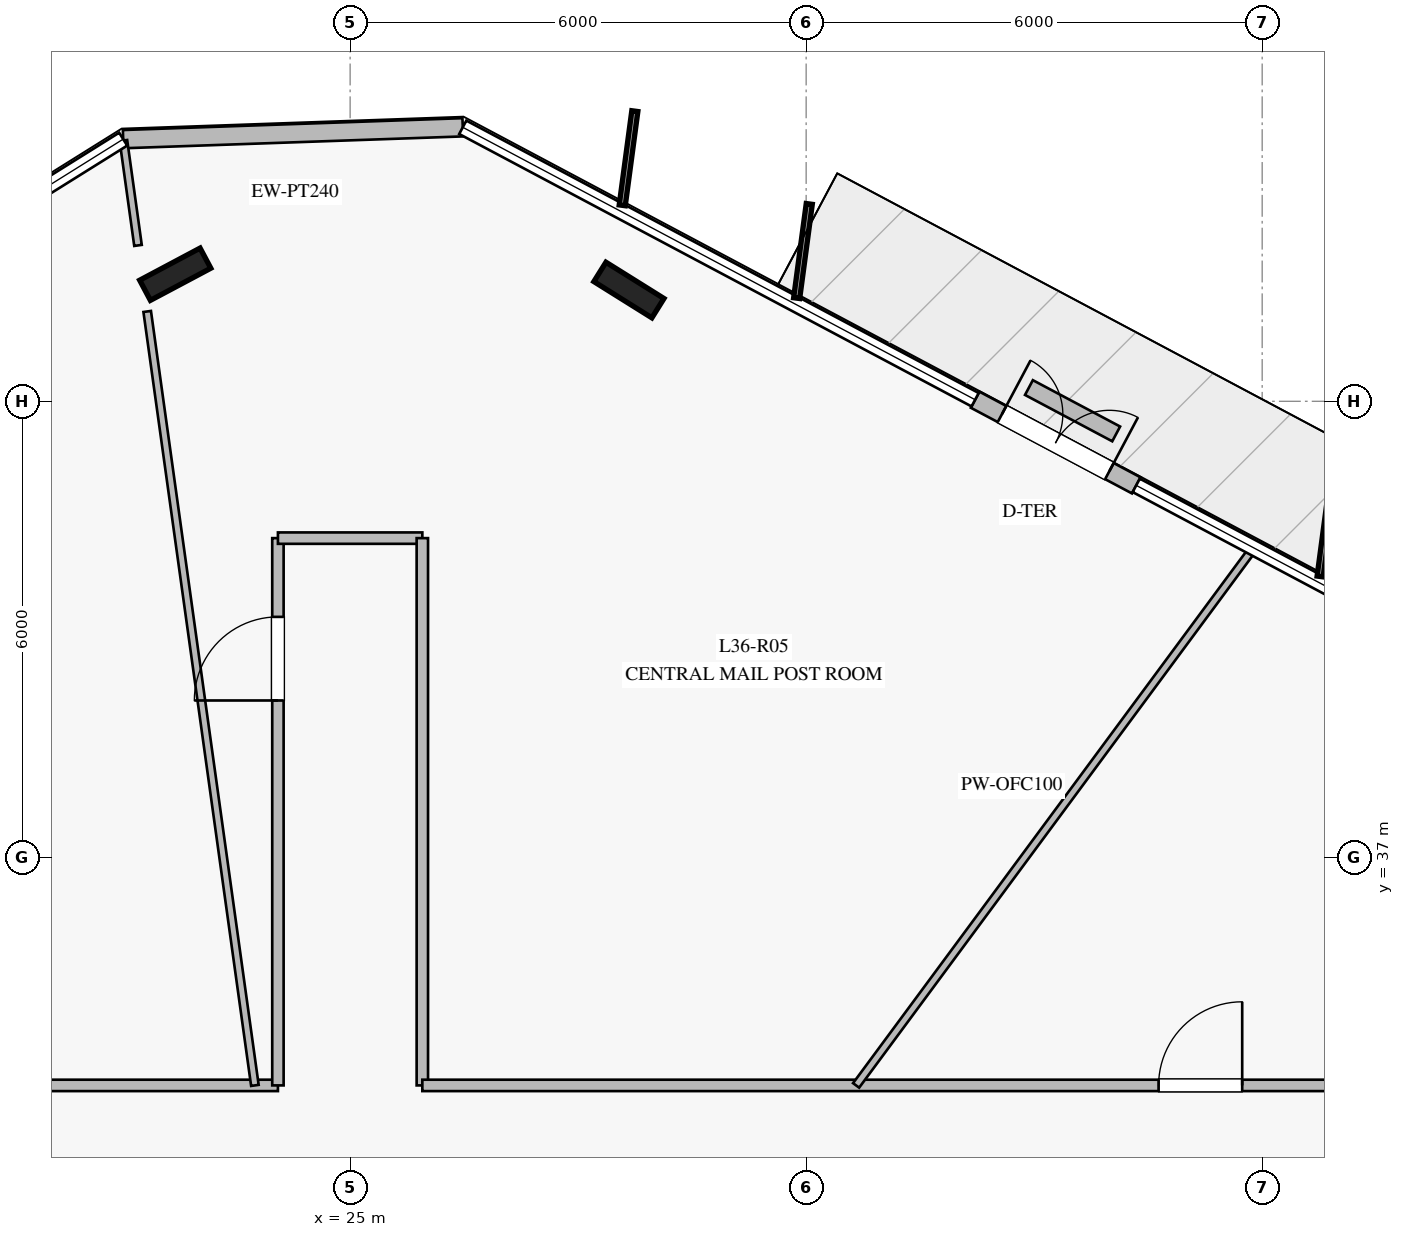
"""IFC4 building model, lengths in metres.
Left out: names, types, materials, properties, quantities, classifications, styles, units other than length and angle.
Written with IfcOpenShell. Run it as: python <this file> out.ifc"""

import sys

from ifc_helpers import new_model, si_unit, direction, frame, frame_2d, origin, origin_2d, place, context, subcontext, project, spatial, rectangle, i_section, extrude, element, fill, save


model = new_model("IFC4")
c1 = context("Model", 3, precision=1e-05, world=origin(), true_north=direction((0.0, 1.0)))
c2 = subcontext(c1, "Body", "Model", "MODEL_VIEW")
j1 = project(units=[si_unit("LENGTHUNIT", "METRE"), si_unit("PLANEANGLEUNIT", "RADIAN")], contexts=[c1])
p1 = place(None, origin())
s1 = spatial("IfcSite", under=j1, at=p1, CompositionType="ELEMENT")
p2 = place(p1, origin())
s2 = spatial("IfcBuilding", under=s1, at=p2, CompositionType="ELEMENT")
p3 = place(p2, frame((0.0, 0.0, 150.4)))
s3 = spatial("IfcBuildingStorey", under=s2, at=p3, CompositionType="ELEMENT", Elevation=150.4)
for number, where, z_axis, x_axis in (
    (1, (28.668, 44.464, 0.0), (0.0, 0.0, 1.0), (-0.848, 0.53, 0.0)),
    (2, (22.699, 44.672, 0.0), (0.0, 0.0, 1.0), (0.883, 0.469, 0.0)),
):
    element("IfcColumn", number, at=place(p3, frame(where, z_axis=z_axis, x_axis=x_axis)), inside=s3, PredefinedType="COLUMN", context=c2, shape_type="SweptSolid", body=[
        extrude(i_section(OverallWidth=0.3, OverallDepth=0.9, WebThickness=0.019, FlangeThickness=0.035, at=origin_2d()), origin(), (0.0, 0.0, 1.0), 4.0),
    ])
p4 = place(p3, frame((35.343, 41.894, 0.0), z_axis=(0.0, 0.0, 1.0), x_axis=(-0.883005107209, 0.469363378037, 0.0)))
e3 = element("IfcWall", 3, at=p4, inside=s3, PredefinedType="STANDARD", context=c2, shape_type="SweptSolid", body=[
    extrude(rectangle(XDim=2.401, YDim=0.24, at=frame_2d((1.201, 0.0))), origin(), (0.0, 0.0, 1.0), 3.76),
])
p5 = place(p4, frame((0.4, 0.0, 0.0)))
e4 = element("IfcOpeningElement", 4, at=p5, cuts=e3, PredefinedType="OPENING", context=c2, shape_type="SweptSolid", body=[
    extrude(rectangle(XDim=1.6, YDim=2.25, at=frame_2d((0.8, 1.125))), frame((0.0, 0.13, 0.0), z_axis=(0.0, -1.0, 0.0), x_axis=(1.0, 0.0, 0.0)), (0.0, 0.0, 1.0), 0.26),
])
p6 = place(p3, frame((26.482, 46.605, 0.0), z_axis=(0.0, 0.0, 1.0), x_axis=(-0.999390988908, -0.034894860495, 0.0)))
e5 = element("IfcWall", 5, at=p6, inside=s3, PredefinedType="STANDARD", context=c2, shape_type="SweptSolid", body=[
    extrude(rectangle(XDim=4.471, YDim=0.24, at=frame_2d((2.235, 0.0))), origin(), (0.0, 0.0, 1.0), 3.76),
])
p7 = place(p3, frame((35.079, 42.571, 0.0), z_axis=(0.0, 0.0, 1.0), x_axis=(-0.883152186811, 0.469086575091, 0.0)))
e6 = element("IfcWall", 6, at=p7, inside=s3, PredefinedType="USERDEFINED", context=c2, shape_type="SweptSolid", body=[
    extrude(rectangle(XDim=1.3, YDim=0.22, at=frame_2d((0.65, 0.0))), origin(), (0.0, 0.0, 1.0), 0.4),
])
p8 = place(p3, frame((17.2, 34.0, 0.0), z_axis=(0.0, 0.0, 1.0), x_axis=(1.0, 0.0, 0.0)))
e7 = element("IfcWall", 7, at=p8, inside=s3, PredefinedType="PARTITIONING", context=c2, shape_type="SweptSolid", body=[
    extrude(rectangle(XDim=6.85, YDim=0.15, at=frame_2d((3.425, 0.0))), origin(), (0.0, 0.0, 1.0), 3.21),
])
p9 = place(p3, frame((24.05, 34.0, 0.0), z_axis=(0.0, 0.0, 1.0), x_axis=(0.0, 1.0, 0.0)))
e8 = element("IfcWall", 8, at=p9, inside=s3, PredefinedType="PARTITIONING", context=c2, shape_type="SweptSolid", body=[
    extrude(rectangle(XDim=7.2, YDim=0.15, at=frame_2d((3.6, 0.0))), origin(), (0.0, 0.0, 1.0), 3.36),
])
p10 = place(p9, frame((5.064, 0.0, 0.0)))
e9 = element("IfcOpeningElement", 9, at=p10, cuts=e8, PredefinedType="OPENING", context=c2, shape_type="SweptSolid", body=[
    extrude(rectangle(XDim=1.1, YDim=2.2, at=frame_2d((0.55, 1.1))), frame((0.0, 0.085, 0.0), z_axis=(0.0, -1.0, 0.0), x_axis=(1.0, 0.0, 0.0)), (0.0, 0.0, 1.0), 0.17),
])
p11 = place(p3, frame((24.05, 41.2, 0.0), z_axis=(0.0, 0.0, 1.0), x_axis=(1.0, 0.0, 0.0)))
e10 = element("IfcWall", 10, at=p11, inside=s3, PredefinedType="PARTITIONING", context=c2, shape_type="SweptSolid", body=[
    extrude(rectangle(XDim=1.9, YDim=0.15, at=frame_2d((0.95, 0.0))), origin(), (0.0, 0.0, 1.0), 3.76),
])
p12 = place(p3, frame((25.95, 41.2, 0.0), z_axis=(0.0, 0.0, 1.0), x_axis=(0.0, -1.0, 0.0)))
e11 = element("IfcWall", 11, at=p12, inside=s3, PredefinedType="PARTITIONING", context=c2, shape_type="SweptSolid", body=[
    extrude(rectangle(XDim=7.2, YDim=0.15, at=frame_2d((3.6, 0.0))), origin(), (0.0, 0.0, 1.0), 3.36),
])
p13 = place(p3, frame((25.95, 34.0, 0.0), z_axis=(0.0, 0.0, 1.0), x_axis=(1.0, 0.0, 0.0)))
e12 = element("IfcWall", 12, at=p13, inside=s3, PredefinedType="PARTITIONING", context=c2, shape_type="SweptSolid", body=[
    extrude(rectangle(XDim=15.25, YDim=0.15, at=frame_2d((7.625, 0.0))), origin(), (0.0, 0.0, 1.0), 3.21),
])
p14 = place(p13, frame((9.687, 0.0, 0.0)))
e13 = element("IfcOpeningElement", 13, at=p14, cuts=e12, PredefinedType="OPENING", context=c2, shape_type="SweptSolid", body=[
    extrude(rectangle(XDim=1.1, YDim=2.2, at=frame_2d((0.55, 1.1))), frame((0.0, 0.085, 0.0), z_axis=(0.0, -1.0, 0.0), x_axis=(1.0, 0.0, 0.0)), (0.0, 0.0, 1.0), 0.17),
])
p15 = place(p3, frame((31.657, 34.0, 0.0), z_axis=(0.0, 0.0, 1.0), x_axis=(0.594620152086, 0.804006762865, 0.0)))
e14 = element("IfcWall", 14, at=p15, inside=s3, PredefinedType="MOVABLE", context=c2, shape_type="SweptSolid", body=[
    extrude(rectangle(XDim=8.779, YDim=0.1, at=frame_2d((4.389, 0.0))), origin(), (0.0, 0.0, 1.0), 3.16),
])
p16 = place(p3, frame((23.747, 34.0, 0.0), z_axis=(0.0, 0.0, 1.0), x_axis=(-0.137839547671, 0.990454571951, 0.0)))
e15 = element("IfcWall", 15, at=p16, inside=s3, PredefinedType="MOVABLE", context=c2, shape_type="SweptSolid", body=[
    extrude(rectangle(XDim=10.28, YDim=0.1, at=frame_2d((5.14, 0.0))), origin(), (0.0, 0.0, 1.0), 3.16),
])
p17 = place(p3, frame((22.209, 45.051, 0.0), z_axis=(0.0, 0.0, 1.0), x_axis=(-0.137740294841, 0.990468379696, 0.0)))
e16 = element("IfcWall", 16, at=p17, inside=s3, PredefinedType="MOVABLE", context=c2, shape_type="SweptSolid", body=[
    extrude(rectangle(XDim=1.393, YDim=0.1, at=frame_2d((0.697, 0.0))), origin(), (0.0, 0.0, 1.0), 3.76),
])
p18 = place(p5, frame((1.6, 0.0, 0.0), z_axis=(0.0, 0.0, 1.0), x_axis=(-1.0, 0.0, 0.0)))
e17 = element("IfcDoor", 17, at=p18, inside=s3, OperationType="DOUBLE_DOOR_SINGLE_SWING", PredefinedType="DOOR", context=c2, shape_type="SweptSolid", body=[
    extrude(rectangle(XDim=1.6, YDim=2.25, at=frame_2d((0.8, 1.125))), frame((0.0, 0.025, 0.0), z_axis=(0.0, -1.0, 0.0), x_axis=(1.0, 0.0, 0.0)), (0.0, 0.0, 1.0), 0.05),
])
fill(e4, e17)
p19 = place(p14, origin())
e18 = element("IfcDoor", 18, at=p19, inside=s3, OperationType="SINGLE_SWING_RIGHT", PredefinedType="DOOR", context=c2, shape_type="SweptSolid", body=[
    extrude(rectangle(XDim=1.1, YDim=2.2, at=frame_2d((0.55, 1.1))), frame((0.0, 0.025, 0.0), z_axis=(0.0, -1.0, 0.0), x_axis=(1.0, 0.0, 0.0)), (0.0, 0.0, 1.0), 0.05),
])
fill(e13, e18)
p20 = place(p10, origin())
e19 = element("IfcDoor", 19, at=p20, inside=s3, OperationType="SINGLE_SWING_LEFT", PredefinedType="DOOR", context=c2, shape_type="SweptSolid", body=[
    extrude(rectangle(XDim=1.1, YDim=2.2, at=frame_2d((0.55, 1.1))), frame((0.0, 0.025, 0.0), z_axis=(0.0, -1.0, 0.0), x_axis=(1.0, 0.0, 0.0)), (0.0, 0.0, 1.0), 0.05),
])
fill(e9, e19)
save(model, sys.argv[1])
